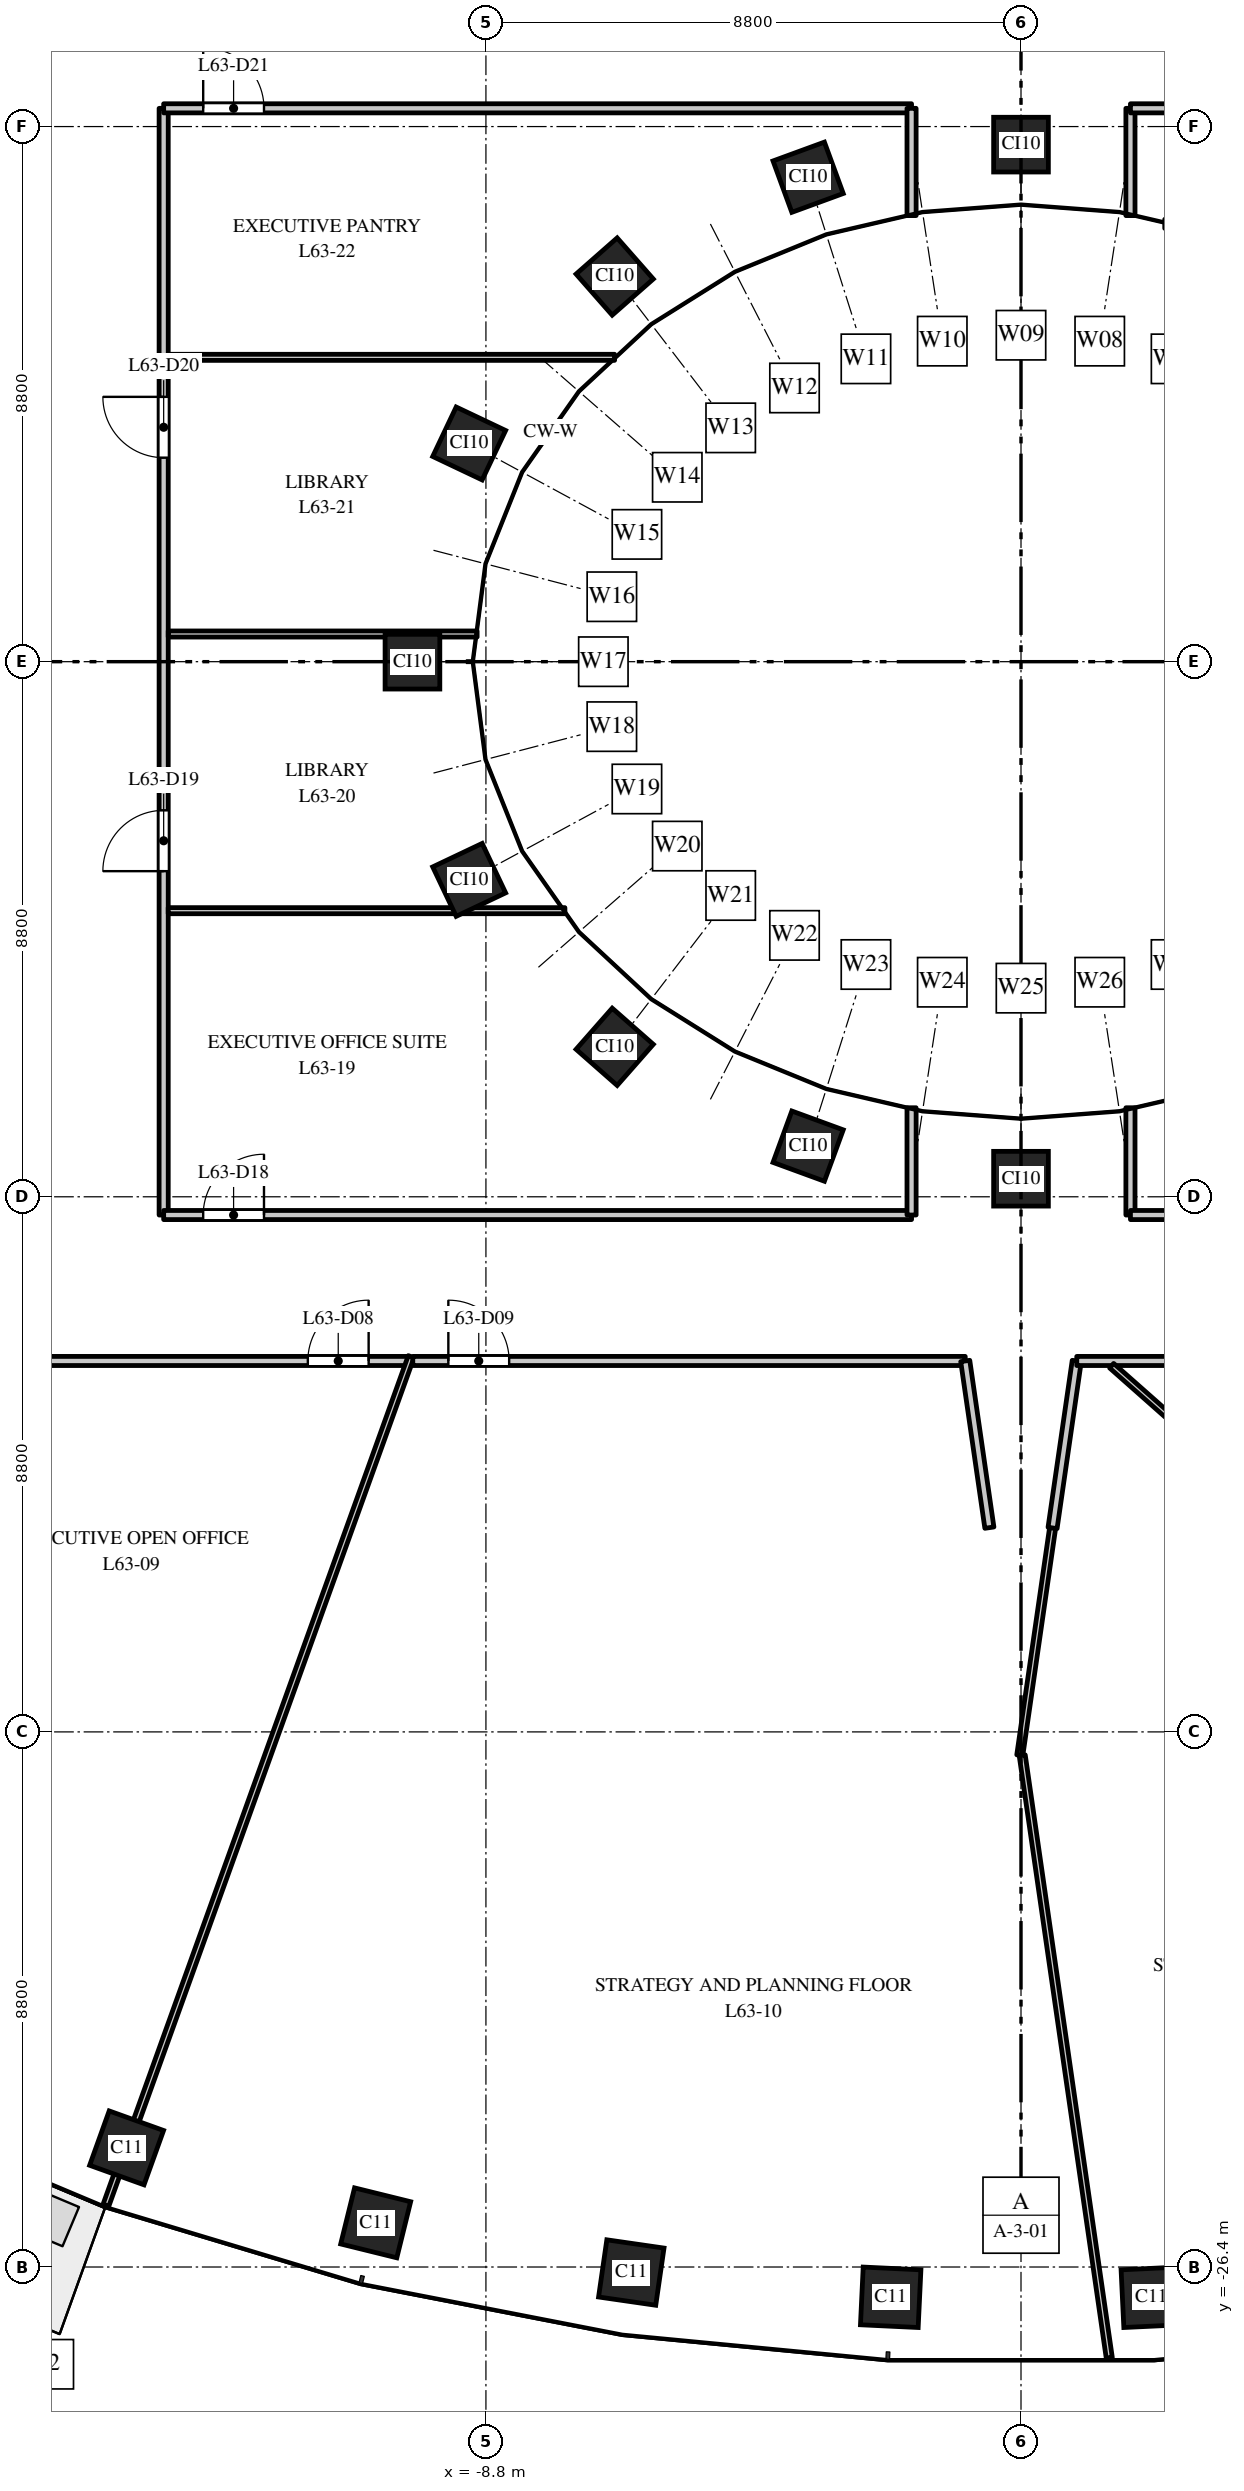
"""IFC4 building model, lengths in metres.
Left out: names, types, materials, properties, quantities, classifications, styles, units other than length and angle.
Written with IfcOpenShell. Run it as: python <this file> out.ifc"""

import sys

from ifc_helpers import new_model, si_unit, direction, frame, frame_2d, origin, origin_2d, place, context, subcontext, project, spatial, rectangle, extrude, element, fill, save


model = new_model("IFC4")
c1 = context("Model", 3, precision=1e-05, world=origin(), true_north=direction((0.0, 1.0)))
c2 = subcontext(c1, "Body", "Model", "MODEL_VIEW")
j1 = project(units=[si_unit("LENGTHUNIT", "METRE"), si_unit("PLANEANGLEUNIT", "RADIAN")], contexts=[c1])
p1 = place(None, origin())
s1 = spatial("IfcSite", under=j1, at=p1, CompositionType="ELEMENT")
p2 = place(p1, origin())
s2 = spatial("IfcBuilding", under=s1, at=p2, CompositionType="ELEMENT")
p3 = place(p2, frame((0.0, 0.0, 295.0)))
s3 = spatial("IfcBuildingStorey", under=s2, at=p3, CompositionType="ELEMENT", Elevation=295.0)
for number, where, z_axis, x_axis in (
    (1, (-14.709, -24.441, 0.0), (0.0, 0.0, 1.0), (0.941, -0.338, 0.0)),
    (2, (-10.613, -25.674, 0.0), (0.0, 0.0, 1.0), (0.971, -0.24, 0.0)),
    (3, (-6.409, -26.491, 0.0), (0.0, 0.0, 1.0), (0.99, -0.143, 0.0)),
    (4, (-2.143, -26.898, 0.0), (0.0, 0.0, 1.0), (0.999, -0.048, 0.0)),
    (5, (2.143, -26.898, 0.0), (0.0, 0.0, 1.0), (0.999, 0.048, 0.0)),
):
    element("IfcColumn", number, at=place(p3, frame(where, z_axis=z_axis, x_axis=x_axis)), inside=s3, PredefinedType="COLUMN", context=c2, shape_type="SweptSolid", body=[
        extrude(rectangle(XDim=0.95, YDim=0.95, at=origin_2d()), origin(), (0.0, 0.0, 1.0), 4.0),
    ])
for number, where, z_axis, x_axis in (
    (6, (0.0, 8.503, 0.0), (0.0, 0.0, 1.0), (-1.0, 0.0, 0.0)),
    (7, (-3.501, 7.967, 0.0), (0.0, 0.0, 1.0), (-0.939, -0.344, 0.0)),
    (8, (-6.682, 6.334, 0.0), (0.0, 0.0, 1.0), (-0.751, -0.66, 0.0)),
    (9, (-9.076, 3.588, 0.0), (0.0, 0.0, 1.0), (-0.429, -0.903, 0.0)),
    (10, (-10.008, 0.0, 0.0), (0.0, 0.0, 1.0), (0.0, -1.0, 0.0)),
    (11, (-9.076, -3.588, 0.0), (0.0, 0.0, 1.0), (0.429, -0.903, 0.0)),
    (12, (-6.682, -6.334, 0.0), (0.0, 0.0, 1.0), (0.751, -0.66, 0.0)),
    (13, (-3.501, -7.967, 0.0), (0.0, 0.0, 1.0), (0.939, -0.344, 0.0)),
    (14, (0.0, -8.503, 0.0), (0.0, 0.0, 1.0), (1.0, 0.0, 0.0)),
):
    element("IfcColumn", number, at=place(p3, frame(where, z_axis=z_axis, x_axis=x_axis)), inside=s3, PredefinedType="COLUMN", context=c2, shape_type="SweptSolid", body=[
        extrude(rectangle(XDim=0.9, YDim=0.9, at=origin_2d()), origin(), (0.0, 0.0, 1.0), 4.0),
    ])
p4 = place(p3, frame((-31.5, -11.5, 0.0), z_axis=(0.0, 0.0, 1.0), x_axis=(1.0, 0.0, 0.0)))
e15 = element("IfcWall", 15, at=p4, inside=s3, PredefinedType="PARTITIONING", context=c2, shape_type="SweptSolid", body=[
    extrude(rectangle(XDim=21.432, YDim=0.15, at=frame_2d((10.716, 0.0))), origin(), (0.0, 0.0, 1.0), 2.75),
])
p5 = place(p4, frame((9.15, 0.0, 0.0)))
e16 = element("IfcOpeningElement", 16, at=p5, cuts=e15, PredefinedType="OPENING", context=c2, shape_type="SweptSolid", body=[
    extrude(rectangle(XDim=1.0, YDim=2.1, at=frame_2d((0.5, 1.05))), frame((0.0, 0.085, 0.0), z_axis=(0.0, -1.0, 0.0), x_axis=(1.0, 0.0, 0.0)), (0.0, 0.0, 1.0), 0.17),
])
p6 = place(p4, frame((19.771, 0.0, 0.0)))
e17 = element("IfcOpeningElement", 17, at=p6, cuts=e15, PredefinedType="OPENING", context=c2, shape_type="SweptSolid", body=[
    extrude(rectangle(XDim=1.0, YDim=2.1, at=frame_2d((0.5, 1.05))), frame((0.0, 0.085, 0.0), z_axis=(0.0, -1.0, 0.0), x_axis=(1.0, 0.0, 0.0)), (0.0, 0.0, 1.0), 0.17),
])
p7 = place(p3, frame((-15.049, -25.383, 0.0), z_axis=(0.0, 0.0, 1.0), x_axis=(0.338454781071, 0.94098265721, 0.0)))
e18 = element("IfcWall", 18, at=p7, inside=s3, PredefinedType="PARTITIONING", context=c2, shape_type="SweptSolid", body=[
    extrude(rectangle(XDim=14.829, YDim=0.1, at=frame_2d((7.415, 0.0))), origin(), (0.0, 0.0, 1.0), 2.75),
])
p8 = place(p3, frame((-14.1, -9.1, 0.0), z_axis=(0.0, 0.0, 1.0), x_axis=(0.0, 1.0, 0.0)))
e19 = element("IfcWall", 19, at=p8, inside=s3, PredefinedType="PARTITIONING", context=c2, shape_type="SweptSolid", body=[
    extrude(rectangle(XDim=18.2, YDim=0.15, at=frame_2d((9.1, 0.0))), origin(), (0.0, 0.0, 1.0), 3.7),
])
p9 = place(p8, frame((5.655, 0.0, 0.0)))
e20 = element("IfcOpeningElement", 20, at=p9, cuts=e19, PredefinedType="OPENING", context=c2, shape_type="SweptSolid", body=[
    extrude(rectangle(XDim=1.0, YDim=2.1, at=frame_2d((0.5, 1.05))), frame((0.0, 0.085, 0.0), z_axis=(0.0, -1.0, 0.0), x_axis=(1.0, 0.0, 0.0)), (0.0, 0.0, 1.0), 0.17),
])
p10 = place(p8, frame((12.455, 0.0, 0.0)))
e21 = element("IfcOpeningElement", 21, at=p10, cuts=e19, PredefinedType="OPENING", context=c2, shape_type="SweptSolid", body=[
    extrude(rectangle(XDim=1.0, YDim=2.1, at=frame_2d((0.5, 1.05))), frame((0.0, 0.085, 0.0), z_axis=(0.0, -1.0, 0.0), x_axis=(1.0, 0.0, 0.0)), (0.0, 0.0, 1.0), 0.17),
])
p11 = place(p3, frame((-14.1, -9.1, 0.0), z_axis=(0.0, 0.0, 1.0), x_axis=(1.0, 0.0, 0.0)))
e22 = element("IfcWall", 22, at=p11, inside=s3, PredefinedType="PARTITIONING", context=c2, shape_type="SweptSolid", body=[
    extrude(rectangle(XDim=12.3, YDim=0.15, at=frame_2d((6.15, 0.0))), origin(), (0.0, 0.0, 1.0), 2.75),
])
p12 = place(p11, frame((0.65, 0.0, 0.0)))
e23 = element("IfcOpeningElement", 23, at=p12, cuts=e22, PredefinedType="OPENING", context=c2, shape_type="SweptSolid", body=[
    extrude(rectangle(XDim=1.0, YDim=2.1, at=frame_2d((0.5, 1.05))), frame((0.0, 0.085, 0.0), z_axis=(0.0, -1.0, 0.0), x_axis=(1.0, 0.0, 0.0)), (0.0, 0.0, 1.0), 0.17),
])
p13 = place(p3, frame((-14.025, -4.095, 0.0), z_axis=(0.0, 0.0, 1.0), x_axis=(1.0, 0.0, 0.0)))
e24 = element("IfcWall", 24, at=p13, inside=s3, PredefinedType="PARTITIONING", context=c2, shape_type="SweptSolid", body=[
    extrude(rectangle(XDim=6.524, YDim=0.1, at=frame_2d((3.262, 0.0))), origin(), (0.0, 0.0, 1.0), 3.0),
])
p14 = place(p3, frame((-14.025, 0.455, 0.0), z_axis=(0.0, 0.0, 1.0), x_axis=(1.0, 0.0, 0.0)))
e25 = element("IfcWall", 25, at=p14, inside=s3, PredefinedType="PARTITIONING", context=c2, shape_type="SweptSolid", body=[
    extrude(rectangle(XDim=5.08, YDim=0.1, at=frame_2d((2.54, 0.0))), origin(), (0.0, 0.0, 1.0), 3.0),
])
p15 = place(p3, frame((-14.025, 5.005, 0.0), z_axis=(0.0, 0.0, 1.0), x_axis=(1.0, 0.0, 0.0)))
e26 = element("IfcWall", 26, at=p15, inside=s3, PredefinedType="PARTITIONING", context=c2, shape_type="SweptSolid", body=[
    extrude(rectangle(XDim=7.341, YDim=0.1, at=frame_2d((3.67, 0.0))), origin(), (0.0, 0.0, 1.0), 3.0),
])
p16 = place(p3, frame((-14.1, 9.1, 0.0), z_axis=(0.0, 0.0, 1.0), x_axis=(1.0, 0.0, 0.0)))
e27 = element("IfcWall", 27, at=p16, inside=s3, PredefinedType="PARTITIONING", context=c2, shape_type="SweptSolid", body=[
    extrude(rectangle(XDim=12.3, YDim=0.15, at=frame_2d((6.15, 0.0))), origin(), (0.0, 0.0, 1.0), 2.75),
])
p17 = place(p16, frame((0.65, 0.0, 0.0)))
e28 = element("IfcOpeningElement", 28, at=p17, cuts=e27, PredefinedType="OPENING", context=c2, shape_type="SweptSolid", body=[
    extrude(rectangle(XDim=1.0, YDim=2.1, at=frame_2d((0.5, 1.05))), frame((0.0, 0.085, 0.0), z_axis=(0.0, -1.0, 0.0), x_axis=(1.0, 0.0, 0.0)), (0.0, 0.0, 1.0), 0.17),
])
p18 = place(p3, frame((-10.003, -11.5, 0.0), z_axis=(0.0, 0.0, 1.0), x_axis=(1.0, 0.0, 0.0)))
e29 = element("IfcWall", 29, at=p18, inside=s3, PredefinedType="PARTITIONING", context=c2, shape_type="SweptSolid", body=[
    extrude(rectangle(XDim=9.086, YDim=0.15, at=frame_2d((4.543, 0.0))), origin(), (0.0, 0.0, 1.0), 2.75),
])
p19 = place(p18, frame((0.585, 0.0, 0.0)))
e30 = element("IfcOpeningElement", 30, at=p19, cuts=e29, PredefinedType="OPENING", context=c2, shape_type="SweptSolid", body=[
    extrude(rectangle(XDim=1.0, YDim=2.1, at=frame_2d((0.5, 1.05))), frame((0.0, 0.085, 0.0), z_axis=(0.0, -1.0, 0.0), x_axis=(1.0, 0.0, 0.0)), (0.0, 0.0, 1.0), 0.17),
])
for number, where, z_axis, x_axis in (
    (31, (-1.8, -9.1, 0.0), (0.0, 0.0, 1.0), (0.0, 1.0, 0.0)),
    (32, (-1.8, 7.336, 0.0), (0.0, 0.0, 1.0), (0.0, 1.0, 0.0)),
):
    element("IfcWall", number, at=place(p3, frame(where, z_axis=z_axis, x_axis=x_axis)), inside=s3, PredefinedType="PARTITIONING", context=c2, shape_type="SweptSolid", body=[
        extrude(rectangle(XDim=1.764, YDim=0.15, at=frame_2d((0.882, 0.0))), origin(), (0.0, 0.0, 1.0), 3.0),
    ])
p20 = place(p3, frame((-0.917, -11.5, 0.0), z_axis=(0.0, 0.0, 1.0), x_axis=(0.143333974909, -0.989674376569, 0.0)))
e33 = element("IfcWall", 33, at=p20, inside=s3, PredefinedType="PARTITIONING", context=c2, shape_type="SweptSolid", body=[
    extrude(rectangle(XDim=2.77, YDim=0.15, at=frame_2d((1.385, 0.0))), origin(), (0.0, 0.0, 1.0), 2.85),
])
p21 = place(p3, frame((-0.02, -17.984, 0.0), z_axis=(0.0, 0.0, 1.0), x_axis=(0.142959355808, 0.989728560054, 0.0)))
e34 = element("IfcWall", 34, at=p21, inside=s3, PredefinedType="PARTITIONING", context=c2, shape_type="SweptSolid", body=[
    extrude(rectangle(XDim=3.778, YDim=0.1, at=frame_2d((1.889, 0.0))), origin(), (0.0, 0.0, 1.0), 3.7),
])
p22 = place(p3, frame((0.02, -17.984, 0.0), z_axis=(0.0, 0.0, 1.0), x_axis=(0.143001630517, -0.989722452847, 0.0)))
e35 = element("IfcWall", 35, at=p22, inside=s3, PredefinedType="PARTITIONING", context=c2, shape_type="SweptSolid", body=[
    extrude(rectangle(XDim=10.013, YDim=0.1, at=frame_2d((5.007, 0.0))), origin(), (0.0, 0.0, 1.0), 3.0),
])
p23 = place(p3, frame((0.519, -14.246, 0.0), z_axis=(0.0, 0.0, 1.0), x_axis=(0.14341658309, 0.989662408953, 0.0)))
e36 = element("IfcWall", 36, at=p23, inside=s3, PredefinedType="PARTITIONING", context=c2, shape_type="SweptSolid", body=[
    extrude(rectangle(XDim=2.775, YDim=0.15, at=frame_2d((1.387, 0.0))), origin(), (0.0, 0.0, 1.0), 3.7),
])
p24 = place(p3, frame((0.917, -11.5, 0.0), z_axis=(0.0, 0.0, 1.0), x_axis=(1.0, 0.0, 0.0)))
e37 = element("IfcWall", 37, at=p24, inside=s3, PredefinedType="PARTITIONING", context=c2, shape_type="SweptSolid", body=[
    extrude(rectangle(XDim=6.195, YDim=0.15, at=frame_2d((3.098, 0.0))), origin(), (0.0, 0.0, 1.0), 2.85),
])
p25 = place(p24, frame((4.636, 0.0, 0.0)))
e38 = element("IfcOpeningElement", 38, at=p25, cuts=e37, PredefinedType="OPENING", context=c2, shape_type="SweptSolid", body=[
    extrude(rectangle(XDim=1.0, YDim=2.1, at=frame_2d((0.5, 1.05))), frame((0.0, 0.085, 0.0), z_axis=(0.0, -1.0, 0.0), x_axis=(1.0, 0.0, 0.0)), (0.0, 0.0, 1.0), 0.17),
])
p26 = place(p3, frame((1.491, -11.578, 0.0), z_axis=(0.0, 0.0, 1.0), x_axis=(0.749070847305, -0.662489898577, 0.0)))
e39 = element("IfcWall", 39, at=p26, inside=s3, PredefinedType="PARTITIONING", context=c2, shape_type="SweptSolid", body=[
    extrude(rectangle(XDim=9.723, YDim=0.1, at=frame_2d((4.861, 0.0))), origin(), (0.0, 0.0, 1.0), 2.85),
])
p27 = place(p3, frame((1.8, -9.1, 0.0), z_axis=(0.0, 0.0, 1.0), x_axis=(0.0, 1.0, 0.0)))
e40 = element("IfcWall", 40, at=p27, inside=s3, PredefinedType="PARTITIONING", context=c2, shape_type="SweptSolid", body=[
    extrude(rectangle(XDim=1.764, YDim=0.15, at=frame_2d((0.882, 0.0))), origin(), (0.0, 0.0, 1.0), 3.0),
])
p28 = place(p3, frame((1.8, -9.1, 0.0), z_axis=(0.0, 0.0, 1.0), x_axis=(1.0, 0.0, 0.0)))
e41 = element("IfcWall", 41, at=p28, inside=s3, PredefinedType="PARTITIONING", context=c2, shape_type="SweptSolid", body=[
    extrude(rectangle(XDim=12.3, YDim=0.15, at=frame_2d((6.15, 0.0))), origin(), (0.0, 0.0, 1.0), 2.85),
])
p29 = place(p28, frame((2.9, 0.0, 0.0)))
e42 = element("IfcOpeningElement", 42, at=p29, cuts=e41, PredefinedType="OPENING", context=c2, shape_type="SweptSolid", body=[
    extrude(rectangle(XDim=1.0, YDim=2.1, at=frame_2d((0.5, 1.05))), frame((0.0, 0.085, 0.0), z_axis=(0.0, -1.0, 0.0), x_axis=(1.0, 0.0, 0.0)), (0.0, 0.0, 1.0), 0.17),
])
p30 = place(p3, frame((1.8, 7.336, 0.0), z_axis=(0.0, 0.0, 1.0), x_axis=(0.0, 1.0, 0.0)))
e43 = element("IfcWall", 43, at=p30, inside=s3, PredefinedType="PARTITIONING", context=c2, shape_type="SweptSolid", body=[
    extrude(rectangle(XDim=1.764, YDim=0.15, at=frame_2d((0.882, 0.0))), origin(), (0.0, 0.0, 1.0), 3.0),
])
p31 = place(p3, frame((1.8, 9.1, 0.0), z_axis=(0.0, 0.0, 1.0), x_axis=(1.0, 0.0, 0.0)))
e44 = element("IfcWall", 44, at=p31, inside=s3, PredefinedType="PARTITIONING", context=c2, shape_type="SweptSolid", body=[
    extrude(rectangle(XDim=12.3, YDim=0.15, at=frame_2d((6.15, 0.0))), origin(), (0.0, 0.0, 1.0), 2.85),
])
p32 = place(p31, frame((2.9, 0.0, 0.0)))
e45 = element("IfcOpeningElement", 45, at=p32, cuts=e44, PredefinedType="OPENING", context=c2, shape_type="SweptSolid", body=[
    extrude(rectangle(XDim=1.0, YDim=2.1, at=frame_2d((0.5, 1.05))), frame((0.0, 0.085, 0.0), z_axis=(0.0, -1.0, 0.0), x_axis=(1.0, 0.0, 0.0)), (0.0, 0.0, 1.0), 0.17),
])
p33 = place(p6, origin())
e46 = element("IfcDoor", 46, at=p33, inside=s3, OperationType="SINGLE_SWING_RIGHT", PredefinedType="DOOR", context=c2, shape_type="SweptSolid", body=[
    extrude(rectangle(XDim=1.0, YDim=2.1, at=frame_2d((0.5, 1.05))), frame((0.0, 0.025, 0.0), z_axis=(0.0, -1.0, 0.0), x_axis=(1.0, 0.0, 0.0)), (0.0, 0.0, 1.0), 0.05),
])
fill(e17, e46)
p34 = place(p19, origin())
e47 = element("IfcDoor", 47, at=p34, inside=s3, OperationType="SINGLE_SWING_LEFT", PredefinedType="DOOR", context=c2, shape_type="SweptSolid", body=[
    extrude(rectangle(XDim=1.0, YDim=2.1, at=frame_2d((0.5, 1.05))), frame((0.0, 0.025, 0.0), z_axis=(0.0, -1.0, 0.0), x_axis=(1.0, 0.0, 0.0)), (0.0, 0.0, 1.0), 0.05),
])
fill(e30, e47)
p35 = place(p12, origin())
e48 = element("IfcDoor", 48, at=p35, inside=s3, OperationType="SINGLE_SWING_RIGHT", PredefinedType="DOOR", context=c2, shape_type="SweptSolid", body=[
    extrude(rectangle(XDim=1.0, YDim=2.1, at=frame_2d((0.5, 1.05))), frame((0.0, 0.025, 0.0), z_axis=(0.0, -1.0, 0.0), x_axis=(1.0, 0.0, 0.0)), (0.0, 0.0, 1.0), 0.05),
])
fill(e23, e48)
p36 = place(p9, origin())
e49 = element("IfcDoor", 49, at=p36, inside=s3, OperationType="SINGLE_SWING_LEFT", PredefinedType="DOOR", context=c2, shape_type="SweptSolid", body=[
    extrude(rectangle(XDim=1.0, YDim=2.1, at=frame_2d((0.5, 1.05))), frame((0.0, 0.025, 0.0), z_axis=(0.0, -1.0, 0.0), x_axis=(1.0, 0.0, 0.0)), (0.0, 0.0, 1.0), 0.05),
])
fill(e20, e49)
p37 = place(p10, origin())
e50 = element("IfcDoor", 50, at=p37, inside=s3, OperationType="SINGLE_SWING_RIGHT", PredefinedType="DOOR", context=c2, shape_type="SweptSolid", body=[
    extrude(rectangle(XDim=1.0, YDim=2.1, at=frame_2d((0.5, 1.05))), frame((0.0, 0.025, 0.0), z_axis=(0.0, -1.0, 0.0), x_axis=(1.0, 0.0, 0.0)), (0.0, 0.0, 1.0), 0.05),
])
fill(e21, e50)
p38 = place(p17, origin())
e51 = element("IfcDoor", 51, at=p38, inside=s3, OperationType="SINGLE_SWING_LEFT", PredefinedType="DOOR", context=c2, shape_type="SweptSolid", body=[
    extrude(rectangle(XDim=1.0, YDim=2.1, at=frame_2d((0.5, 1.05))), frame((0.0, 0.025, 0.0), z_axis=(0.0, -1.0, 0.0), x_axis=(1.0, 0.0, 0.0)), (0.0, 0.0, 1.0), 0.05),
])
fill(e28, e51)
save(model, sys.argv[1])
